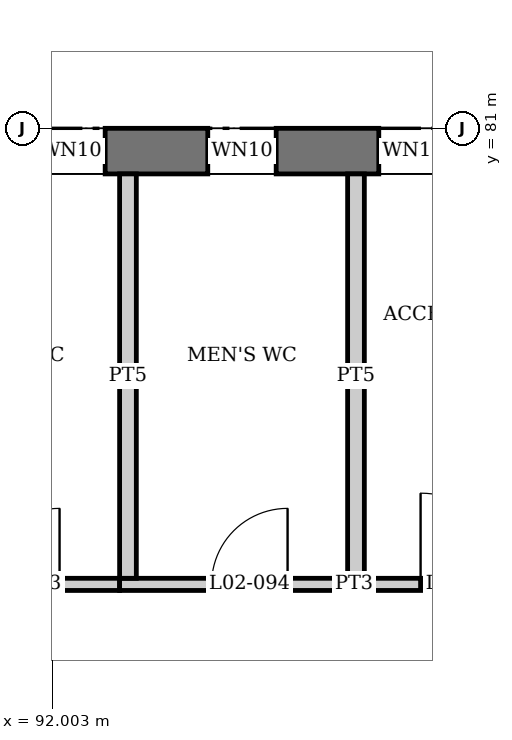
"""IFC4 building model, lengths in metres.
Left out: names, types, materials, properties, quantities, classifications, styles, units other than length and angle.
Written with IfcOpenShell. Run it as: python <this file> out.ifc"""

import sys

from ifc_helpers import new_model, si_unit, direction, frame, frame_2d, origin, place, context, subcontext, project, spatial, rectangle, extrude, element, fill, save


model = new_model("IFC4")
c1 = context("Model", 3, precision=1e-05, world=origin(), true_north=direction((0.0, 1.0)))
c2 = subcontext(c1, "Body", "Model", "MODEL_VIEW")
j1 = project(units=[si_unit("LENGTHUNIT", "METRE"), si_unit("PLANEANGLEUNIT", "RADIAN")], contexts=[c1])
p1 = place(None, origin())
s1 = spatial("IfcSite", under=j1, at=p1, CompositionType="ELEMENT")
p2 = place(p1, origin())
s2 = spatial("IfcBuilding", under=s1, at=p2, CompositionType="ELEMENT")
p3 = place(p2, frame((0.0, 0.0, 10.5)))
s3 = spatial("IfcBuildingStorey", under=s2, at=p3, CompositionType="ELEMENT", Elevation=10.5)
p4 = place(p3, frame((0.0, 80.7, 0.0), z_axis=(0.0, 0.0, 1.0), x_axis=(1.0, 0.0, 0.0)))
e1 = element("IfcWall", 1, at=p4, inside=s3, PredefinedType="SHEAR", context=c2, shape_type="SweptSolid", body=[
    extrude(rectangle(XDim=180.0, YDim=0.6, at=frame_2d((90.0, 0.0))), origin(), (0.0, 0.0, 1.0), 4.35),
])
p5 = place(p4, frame((1.35, 0.0, 0.9)))
e2 = element("IfcOpeningElement", 2, at=p5, cuts=e1, PredefinedType="OPENING", context=c2, shape_type="SweptSolid", body=[
    extrude(rectangle(XDim=1.8, YDim=1.5, at=frame_2d((0.9, 0.75))), frame((0.0, 0.31, 0.0), z_axis=(0.0, -1.0, 0.0), x_axis=(1.0, 0.0, 0.0)), (0.0, 0.0, 1.0), 0.62),
])
p6 = place(p4, frame((5.85, 0.0, 0.9)))
e3 = element("IfcOpeningElement", 3, at=p6, cuts=e1, PredefinedType="OPENING", context=c2, shape_type="SweptSolid", body=[
    extrude(rectangle(XDim=1.8, YDim=1.5, at=frame_2d((0.9, 0.75))), frame((0.0, 0.31, 0.0), z_axis=(0.0, -1.0, 0.0), x_axis=(1.0, 0.0, 0.0)), (0.0, 0.0, 1.0), 0.62),
])
p7 = place(p4, frame((10.35, 0.0, 0.9)))
e4 = element("IfcOpeningElement", 4, at=p7, cuts=e1, PredefinedType="OPENING", context=c2, shape_type="SweptSolid", body=[
    extrude(rectangle(XDim=1.8, YDim=1.5, at=frame_2d((0.9, 0.75))), frame((0.0, 0.31, 0.0), z_axis=(0.0, -1.0, 0.0), x_axis=(1.0, 0.0, 0.0)), (0.0, 0.0, 1.0), 0.62),
])
p8 = place(p4, frame((14.85, 0.0, 0.9)))
e5 = element("IfcOpeningElement", 5, at=p8, cuts=e1, PredefinedType="OPENING", context=c2, shape_type="SweptSolid", body=[
    extrude(rectangle(XDim=1.8, YDim=1.5, at=frame_2d((0.9, 0.75))), frame((0.0, 0.31, 0.0), z_axis=(0.0, -1.0, 0.0), x_axis=(1.0, 0.0, 0.0)), (0.0, 0.0, 1.0), 0.62),
])
p9 = place(p4, frame((19.35, 0.0, 0.9)))
e6 = element("IfcOpeningElement", 6, at=p9, cuts=e1, PredefinedType="OPENING", context=c2, shape_type="SweptSolid", body=[
    extrude(rectangle(XDim=1.8, YDim=1.5, at=frame_2d((0.9, 0.75))), frame((0.0, 0.31, 0.0), z_axis=(0.0, -1.0, 0.0), x_axis=(1.0, 0.0, 0.0)), (0.0, 0.0, 1.0), 0.62),
])
p10 = place(p4, frame((23.85, 0.0, 0.9)))
e7 = element("IfcOpeningElement", 7, at=p10, cuts=e1, PredefinedType="OPENING", context=c2, shape_type="SweptSolid", body=[
    extrude(rectangle(XDim=1.8, YDim=1.5, at=frame_2d((0.9, 0.75))), frame((0.0, 0.31, 0.0), z_axis=(0.0, -1.0, 0.0), x_axis=(1.0, 0.0, 0.0)), (0.0, 0.0, 1.0), 0.62),
])
p11 = place(p4, frame((36.45, 0.0, 2.4)))
e8 = element("IfcOpeningElement", 8, at=p11, cuts=e1, PredefinedType="OPENING", context=c2, shape_type="SweptSolid", body=[
    extrude(rectangle(XDim=3.6, YDim=1.0, at=frame_2d((1.8, 0.5))), frame((0.0, 0.31, 0.0), z_axis=(0.0, -1.0, 0.0), x_axis=(1.0, 0.0, 0.0)), (0.0, 0.0, 1.0), 0.62),
])
p12 = place(p4, frame((40.95, 0.0, 2.4)))
e9 = element("IfcOpeningElement", 9, at=p12, cuts=e1, PredefinedType="OPENING", context=c2, shape_type="SweptSolid", body=[
    extrude(rectangle(XDim=3.6, YDim=1.0, at=frame_2d((1.8, 0.5))), frame((0.0, 0.31, 0.0), z_axis=(0.0, -1.0, 0.0), x_axis=(1.0, 0.0, 0.0)), (0.0, 0.0, 1.0), 0.62),
])
p13 = place(p4, frame((45.45, 0.0, 2.4)))
e10 = element("IfcOpeningElement", 10, at=p13, cuts=e1, PredefinedType="OPENING", context=c2, shape_type="SweptSolid", body=[
    extrude(rectangle(XDim=3.6, YDim=1.0, at=frame_2d((1.8, 0.5))), frame((0.0, 0.31, 0.0), z_axis=(0.0, -1.0, 0.0), x_axis=(1.0, 0.0, 0.0)), (0.0, 0.0, 1.0), 0.62),
])
p14 = place(p4, frame((49.95, 0.0, 2.4)))
e11 = element("IfcOpeningElement", 11, at=p14, cuts=e1, PredefinedType="OPENING", context=c2, shape_type="SweptSolid", body=[
    extrude(rectangle(XDim=3.6, YDim=1.0, at=frame_2d((1.8, 0.5))), frame((0.0, 0.31, 0.0), z_axis=(0.0, -1.0, 0.0), x_axis=(1.0, 0.0, 0.0)), (0.0, 0.0, 1.0), 0.62),
])
p15 = place(p4, frame((55.65, 0.0, 1.2)))
e12 = element("IfcOpeningElement", 12, at=p15, cuts=e1, PredefinedType="OPENING", context=c2, shape_type="SweptSolid", body=[
    extrude(rectangle(XDim=1.2, YDim=1.2, at=frame_2d((0.6, 0.6))), frame((0.0, 0.31, 0.0), z_axis=(0.0, -1.0, 0.0), x_axis=(1.0, 0.0, 0.0)), (0.0, 0.0, 1.0), 0.62),
])
p16 = place(p4, frame((60.15, 0.0, 1.2)))
e13 = element("IfcOpeningElement", 13, at=p16, cuts=e1, PredefinedType="OPENING", context=c2, shape_type="SweptSolid", body=[
    extrude(rectangle(XDim=1.2, YDim=1.2, at=frame_2d((0.6, 0.6))), frame((0.0, 0.31, 0.0), z_axis=(0.0, -1.0, 0.0), x_axis=(1.0, 0.0, 0.0)), (0.0, 0.0, 1.0), 0.62),
])
p17 = place(p4, frame((63.45, 0.0, 2.4)))
e14 = element("IfcOpeningElement", 14, at=p17, cuts=e1, PredefinedType="OPENING", context=c2, shape_type="SweptSolid", body=[
    extrude(rectangle(XDim=3.6, YDim=1.0, at=frame_2d((1.8, 0.5))), frame((0.0, 0.31, 0.0), z_axis=(0.0, -1.0, 0.0), x_axis=(1.0, 0.0, 0.0)), (0.0, 0.0, 1.0), 0.62),
])
p18 = place(p4, frame((67.95, 0.0, 2.4)))
e15 = element("IfcOpeningElement", 15, at=p18, cuts=e1, PredefinedType="OPENING", context=c2, shape_type="SweptSolid", body=[
    extrude(rectangle(XDim=3.6, YDim=1.0, at=frame_2d((1.8, 0.5))), frame((0.0, 0.31, 0.0), z_axis=(0.0, -1.0, 0.0), x_axis=(1.0, 0.0, 0.0)), (0.0, 0.0, 1.0), 0.62),
])
p19 = place(p4, frame((72.45, 0.0, 2.4)))
e16 = element("IfcOpeningElement", 16, at=p19, cuts=e1, PredefinedType="OPENING", context=c2, shape_type="SweptSolid", body=[
    extrude(rectangle(XDim=3.6, YDim=1.0, at=frame_2d((1.8, 0.5))), frame((0.0, 0.31, 0.0), z_axis=(0.0, -1.0, 0.0), x_axis=(1.0, 0.0, 0.0)), (0.0, 0.0, 1.0), 0.62),
])
p20 = place(p4, frame((76.95, 0.0, 2.4)))
e17 = element("IfcOpeningElement", 17, at=p20, cuts=e1, PredefinedType="OPENING", context=c2, shape_type="SweptSolid", body=[
    extrude(rectangle(XDim=3.6, YDim=1.0, at=frame_2d((1.8, 0.5))), frame((0.0, 0.31, 0.0), z_axis=(0.0, -1.0, 0.0), x_axis=(1.0, 0.0, 0.0)), (0.0, 0.0, 1.0), 0.62),
])
p21 = place(p4, frame((91.8, 0.0, 1.7)))
e18 = element("IfcOpeningElement", 18, at=p21, cuts=e1, PredefinedType="OPENING", context=c2, shape_type="SweptSolid", body=[
    extrude(rectangle(XDim=0.9, YDim=0.6, at=frame_2d((0.45, 0.3))), frame((0.0, 0.31, 0.0), z_axis=(0.0, -1.0, 0.0), x_axis=(1.0, 0.0, 0.0)), (0.0, 0.0, 1.0), 0.62),
])
p22 = place(p4, frame((96.3, 0.0, 1.7)))
e19 = element("IfcOpeningElement", 19, at=p22, cuts=e1, PredefinedType="OPENING", context=c2, shape_type="SweptSolid", body=[
    extrude(rectangle(XDim=0.9, YDim=0.6, at=frame_2d((0.45, 0.3))), frame((0.0, 0.31, 0.0), z_axis=(0.0, -1.0, 0.0), x_axis=(1.0, 0.0, 0.0)), (0.0, 0.0, 1.0), 0.62),
])
p23 = place(p4, frame((100.35, 0.0, 0.9)))
e20 = element("IfcOpeningElement", 20, at=p23, cuts=e1, PredefinedType="OPENING", context=c2, shape_type="SweptSolid", body=[
    extrude(rectangle(XDim=1.8, YDim=1.5, at=frame_2d((0.9, 0.75))), frame((0.0, 0.31, 0.0), z_axis=(0.0, -1.0, 0.0), x_axis=(1.0, 0.0, 0.0)), (0.0, 0.0, 1.0), 0.62),
])
p24 = place(p4, frame((104.85, 0.0, 0.9)))
e21 = element("IfcOpeningElement", 21, at=p24, cuts=e1, PredefinedType="OPENING", context=c2, shape_type="SweptSolid", body=[
    extrude(rectangle(XDim=1.8, YDim=1.5, at=frame_2d((0.9, 0.75))), frame((0.0, 0.31, 0.0), z_axis=(0.0, -1.0, 0.0), x_axis=(1.0, 0.0, 0.0)), (0.0, 0.0, 1.0), 0.62),
])
p25 = place(p4, frame((109.35, 0.0, 0.9)))
e22 = element("IfcOpeningElement", 22, at=p25, cuts=e1, PredefinedType="OPENING", context=c2, shape_type="SweptSolid", body=[
    extrude(rectangle(XDim=1.8, YDim=1.5, at=frame_2d((0.9, 0.75))), frame((0.0, 0.31, 0.0), z_axis=(0.0, -1.0, 0.0), x_axis=(1.0, 0.0, 0.0)), (0.0, 0.0, 1.0), 0.62),
])
p26 = place(p4, frame((113.85, 0.0, 0.9)))
e23 = element("IfcOpeningElement", 23, at=p26, cuts=e1, PredefinedType="OPENING", context=c2, shape_type="SweptSolid", body=[
    extrude(rectangle(XDim=1.8, YDim=1.5, at=frame_2d((0.9, 0.75))), frame((0.0, 0.31, 0.0), z_axis=(0.0, -1.0, 0.0), x_axis=(1.0, 0.0, 0.0)), (0.0, 0.0, 1.0), 0.62),
])
p27 = place(p4, frame((154.8, 0.0, 1.7)))
e24 = element("IfcOpeningElement", 24, at=p27, cuts=e1, PredefinedType="OPENING", context=c2, shape_type="SweptSolid", body=[
    extrude(rectangle(XDim=0.9, YDim=0.6, at=frame_2d((0.45, 0.3))), frame((0.0, 0.31, 0.0), z_axis=(0.0, -1.0, 0.0), x_axis=(1.0, 0.0, 0.0)), (0.0, 0.0, 1.0), 0.62),
])
p28 = place(p4, frame((159.3, 0.0, 1.7)))
e25 = element("IfcOpeningElement", 25, at=p28, cuts=e1, PredefinedType="OPENING", context=c2, shape_type="SweptSolid", body=[
    extrude(rectangle(XDim=0.9, YDim=0.6, at=frame_2d((0.45, 0.3))), frame((0.0, 0.31, 0.0), z_axis=(0.0, -1.0, 0.0), x_axis=(1.0, 0.0, 0.0)), (0.0, 0.0, 1.0), 0.62),
])
p29 = place(p4, frame((163.05, 0.0, 0.9)))
e26 = element("IfcOpeningElement", 26, at=p29, cuts=e1, PredefinedType="OPENING", context=c2, shape_type="SweptSolid", body=[
    extrude(rectangle(XDim=2.4, YDim=2.1, at=frame_2d((1.2, 1.05))), frame((0.0, 0.31, 0.0), z_axis=(0.0, -1.0, 0.0), x_axis=(1.0, 0.0, 0.0)), (0.0, 0.0, 1.0), 0.62),
])
p30 = place(p4, frame((167.55, 0.0, 0.9)))
e27 = element("IfcOpeningElement", 27, at=p30, cuts=e1, PredefinedType="OPENING", context=c2, shape_type="SweptSolid", body=[
    extrude(rectangle(XDim=2.4, YDim=2.1, at=frame_2d((1.2, 1.05))), frame((0.0, 0.31, 0.0), z_axis=(0.0, -1.0, 0.0), x_axis=(1.0, 0.0, 0.0)), (0.0, 0.0, 1.0), 0.62),
])
p31 = place(p4, frame((94.05, 0.0, 1.7)))
e28 = element("IfcOpeningElement", 28, at=p31, cuts=e1, PredefinedType="OPENING", context=c2, shape_type="SweptSolid", body=[
    extrude(rectangle(XDim=0.9, YDim=0.6, at=frame_2d((0.45, 0.3))), frame((0.0, 0.31, 0.0), z_axis=(0.0, -1.0, 0.0), x_axis=(1.0, 0.0, 0.0)), (0.0, 0.0, 1.0), 0.62),
])
p32 = place(p4, frame((157.05, 0.0, 1.7)))
e29 = element("IfcOpeningElement", 29, at=p32, cuts=e1, PredefinedType="OPENING", context=c2, shape_type="SweptSolid", body=[
    extrude(rectangle(XDim=0.9, YDim=0.6, at=frame_2d((0.45, 0.3))), frame((0.0, 0.31, 0.0), z_axis=(0.0, -1.0, 0.0), x_axis=(1.0, 0.0, 0.0)), (0.0, 0.0, 1.0), 0.62),
])
p33 = place(p3, frame((90.0, 75.0, 0.0), z_axis=(0.0, 0.0, 1.0), x_axis=(1.0, 0.0, 0.0)))
e30 = element("IfcWall", 30, at=p33, inside=s3, PredefinedType="PARTITIONING", context=c2, shape_type="SweptSolid", body=[
    extrude(rectangle(XDim=2.89, YDim=0.16, at=frame_2d((1.445, 0.0))), origin(), (0.0, 0.0, 1.0), 4.35),
])
p34 = place(p33, frame((1.1, 0.0, 0.0)))
e31 = element("IfcOpeningElement", 31, at=p34, cuts=e30, PredefinedType="OPENING", context=c2, shape_type="SweptSolid", body=[
    extrude(rectangle(XDim=1.0, YDim=2.1, at=frame_2d((0.5, 1.05))), frame((0.0, 0.09, 0.0), z_axis=(0.0, -1.0, 0.0), x_axis=(1.0, 0.0, 0.0)), (0.0, 0.0, 1.0), 0.18),
])
p35 = place(p3, frame((92.89, 75.0, 0.0), z_axis=(0.0, 0.0, 1.0), x_axis=(1.0, 0.0, 0.0)))
e32 = element("IfcWall", 32, at=p35, inside=s3, PredefinedType="PARTITIONING", context=c2, shape_type="SweptSolid", body=[
    extrude(rectangle(XDim=6.19, YDim=0.16, at=frame_2d((3.095, 0.0))), origin(), (0.0, 0.0, 1.0), 4.043),
])
p36 = place(p35, frame((1.21, 0.0, 0.0)))
e33 = element("IfcOpeningElement", 33, at=p36, cuts=e32, PredefinedType="OPENING", context=c2, shape_type="SweptSolid", body=[
    extrude(rectangle(XDim=1.0, YDim=2.1, at=frame_2d((0.5, 1.05))), frame((0.0, 0.09, 0.0), z_axis=(0.0, -1.0, 0.0), x_axis=(1.0, 0.0, 0.0)), (0.0, 0.0, 1.0), 0.18),
])
p37 = place(p35, frame((3.96, 0.0, 0.0)))
e34 = element("IfcOpeningElement", 34, at=p37, cuts=e32, PredefinedType="OPENING", context=c2, shape_type="SweptSolid", body=[
    extrude(rectangle(XDim=1.2, YDim=2.1, at=frame_2d((0.6, 1.05))), frame((0.0, 0.09, 0.0), z_axis=(0.0, -1.0, 0.0), x_axis=(1.0, 0.0, 0.0)), (0.0, 0.0, 1.0), 0.18),
])
for number, where, z_axis, x_axis in (
    (35, (93.0, 75.08, 0.0), (0.0, 0.0, 1.0), (0.0, 1.0, 0.0)),
    (36, (96.0, 75.08, 0.0), (0.0, 0.0, 1.0), (0.0, 1.0, 0.0)),
):
    element("IfcWall", number, at=place(p3, frame(where, z_axis=z_axis, x_axis=x_axis)), inside=s3, PredefinedType="PLUMBINGWALL", context=c2, shape_type="SweptSolid", body=[
        extrude(rectangle(XDim=5.32, YDim=0.22, at=frame_2d((2.66, 0.0))), origin(), (0.0, 0.0, 1.0), 4.35),
    ])
p38 = place(p21, origin())
e37 = element("IfcWindow", 37, at=p38, inside=s3, PartitioningType="SINGLE_PANEL", PredefinedType="WINDOW", context=c2, shape_type="SweptSolid", body=[
    extrude(rectangle(XDim=0.9, YDim=0.6, at=frame_2d((0.45, 0.3))), frame((0.0, 0.03, 0.0), z_axis=(0.0, -1.0, 0.0), x_axis=(1.0, 0.0, 0.0)), (0.0, 0.0, 1.0), 0.06),
])
fill(e18, e37)
p39 = place(p22, origin())
e38 = element("IfcWindow", 38, at=p39, inside=s3, PartitioningType="SINGLE_PANEL", PredefinedType="WINDOW", context=c2, shape_type="SweptSolid", body=[
    extrude(rectangle(XDim=0.9, YDim=0.6, at=frame_2d((0.45, 0.3))), frame((0.0, 0.03, 0.0), z_axis=(0.0, -1.0, 0.0), x_axis=(1.0, 0.0, 0.0)), (0.0, 0.0, 1.0), 0.06),
])
fill(e19, e38)
p40 = place(p31, origin())
e39 = element("IfcWindow", 39, at=p40, inside=s3, PartitioningType="SINGLE_PANEL", PredefinedType="WINDOW", context=c2, shape_type="SweptSolid", body=[
    extrude(rectangle(XDim=0.9, YDim=0.6, at=frame_2d((0.45, 0.3))), frame((0.0, 0.03, 0.0), z_axis=(0.0, -1.0, 0.0), x_axis=(1.0, 0.0, 0.0)), (0.0, 0.0, 1.0), 0.06),
])
fill(e28, e39)
p41 = place(p34, origin())
e40 = element("IfcDoor", 40, at=p41, inside=s3, OperationType="SINGLE_SWING_RIGHT", PredefinedType="DOOR", context=c2, shape_type="SweptSolid", body=[
    extrude(rectangle(XDim=1.0, YDim=2.1, at=frame_2d((0.5, 1.05))), frame((0.0, 0.025, 0.0), z_axis=(0.0, -1.0, 0.0), x_axis=(1.0, 0.0, 0.0)), (0.0, 0.0, 1.0), 0.05),
])
fill(e31, e40)
p42 = place(p36, origin())
e41 = element("IfcDoor", 41, at=p42, inside=s3, OperationType="SINGLE_SWING_RIGHT", PredefinedType="DOOR", context=c2, shape_type="SweptSolid", body=[
    extrude(rectangle(XDim=1.0, YDim=2.1, at=frame_2d((0.5, 1.05))), frame((0.0, 0.025, 0.0), z_axis=(0.0, -1.0, 0.0), x_axis=(1.0, 0.0, 0.0)), (0.0, 0.0, 1.0), 0.05),
])
fill(e33, e41)
p43 = place(p37, origin())
e42 = element("IfcDoor", 42, at=p43, inside=s3, OperationType="SINGLE_SWING_LEFT", PredefinedType="DOOR", context=c2, shape_type="SweptSolid", body=[
    extrude(rectangle(XDim=1.2, YDim=2.1, at=frame_2d((0.6, 1.05))), frame((0.0, 0.025, 0.0), z_axis=(0.0, -1.0, 0.0), x_axis=(1.0, 0.0, 0.0)), (0.0, 0.0, 1.0), 0.05),
])
fill(e34, e42)
save(model, sys.argv[1])
